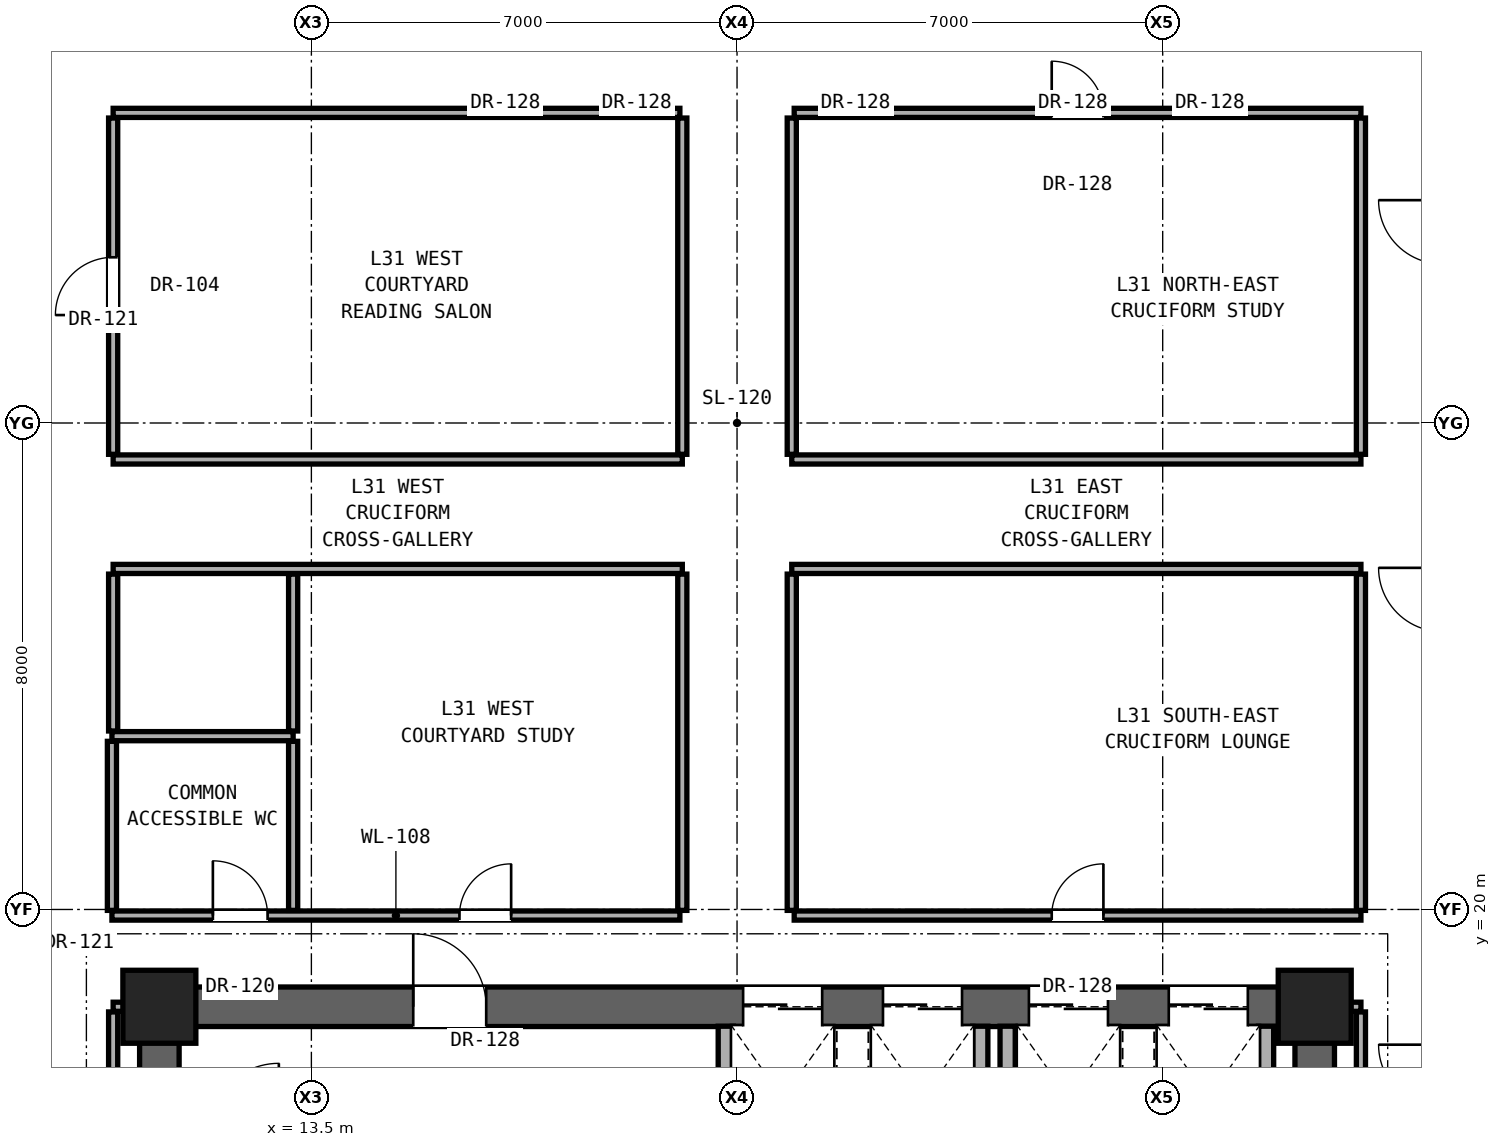
"""IFC4 building model, lengths in metres.
Left out: names, types, materials, properties, quantities, classifications, styles, units other than length and angle.
Written with IfcOpenShell. Run it as: python <this file> out.ifc"""

import sys

from ifc_helpers import new_model, si_unit, direction, frame, frame_2d, origin, origin_2d, place, context, subcontext, project, spatial, rectangle, extrude, element, fill, save


model = new_model("IFC4")
c1 = context("Model", 3, precision=1e-05, world=origin(), true_north=direction((0.0, 1.0)))
c2 = subcontext(c1, "Body", "Model", "MODEL_VIEW")
j1 = project(units=[si_unit("LENGTHUNIT", "METRE"), si_unit("PLANEANGLEUNIT", "RADIAN")], contexts=[c1])
p1 = place(None, origin())
s1 = spatial("IfcSite", under=j1, at=p1, CompositionType="ELEMENT")
p2 = place(p1, origin())
s2 = spatial("IfcBuilding", under=s1, at=p2, CompositionType="ELEMENT")
p3 = place(p2, frame((0.0, 0.0, 111.5)))
s3 = spatial("IfcBuildingStorey", under=s2, at=p3, CompositionType="ELEMENT", Elevation=111.5)
for number, where, z_axis, x_axis in (
    (1, (11.0, 18.4, 0.0), (0.0, 0.0, 1.0), (1.0, 0.0, 0.0)),
    (2, (30.0, 18.4, 0.0), (0.0, 0.0, 1.0), (1.0, 0.0, 0.0)),
):
    element("IfcColumn", number, at=place(p3, frame(where, z_axis=z_axis, x_axis=x_axis)), inside=s3, PredefinedType="COLUMN", context=c2, shape_type="SweptSolid", body=[
        extrude(rectangle(XDim=1.2, YDim=1.2, at=origin_2d()), origin(), (0.0, 0.0, 1.0), 3.3),
    ])
for number, where, z_axis, x_axis in (
    (3, (11.0, 12.4, 0.0), (0.0, 0.0, 1.0), (0.0, 1.0, 0.0)),
    (4, (30.0, 12.4, 0.0), (0.0, 0.0, 1.0), (0.0, 1.0, 0.0)),
):
    element("IfcWall", number, at=place(p3, frame(where, z_axis=z_axis, x_axis=x_axis)), inside=s3, PredefinedType="SHEAR", context=c2, shape_type="SweptSolid", body=[
        extrude(rectangle(XDim=6.0, YDim=0.65, at=frame_2d((3.0, 0.0))), origin(), (0.0, 0.0, 1.0), 3.08),
    ])
p4 = place(p3, frame((11.0, 18.4, 0.0), z_axis=(0.0, 0.0, 1.0), x_axis=(1.0, 0.0, 0.0)))
e5 = element("IfcWall", 5, at=p4, inside=s3, PredefinedType="SHEAR", context=c2, shape_type="SweptSolid", body=[
    extrude(rectangle(XDim=19.0, YDim=0.65, at=frame_2d((9.5, 0.0))), origin(), (0.0, 0.0, 1.0), 3.08),
])
p5 = place(p4, frame((4.175, 0.0, 0.0)))
e6 = element("IfcOpeningElement", 6, at=p5, cuts=e5, PredefinedType="OPENING", context=c2, shape_type="SweptSolid", body=[
    extrude(rectangle(XDim=1.2, YDim=2.25, at=frame_2d((0.6, 1.125))), frame((0.0, 0.335, 0.0), z_axis=(0.0, -1.0, 0.0), x_axis=(1.0, 0.0, 0.0)), (0.0, 0.0, 1.0), 0.67),
])
p6 = place(p4, frame((9.6, 0.0, 0.0)))
e7 = element("IfcOpeningElement", 7, at=p6, cuts=e5, PredefinedType="OPENING", context=c2, shape_type="SweptSolid", body=[
    extrude(rectangle(XDim=1.3, YDim=2.3, at=frame_2d((0.65, 1.15))), frame((0.0, 0.335, 0.0), z_axis=(0.0, -1.0, 0.0), x_axis=(1.0, 0.0, 0.0)), (0.0, 0.0, 1.0), 0.67),
])
p7 = place(p4, frame((11.9, 0.0, 0.0)))
e8 = element("IfcOpeningElement", 8, at=p7, cuts=e5, PredefinedType="OPENING", context=c2, shape_type="SweptSolid", body=[
    extrude(rectangle(XDim=1.3, YDim=2.3, at=frame_2d((0.65, 1.15))), frame((0.0, 0.335, 0.0), z_axis=(0.0, -1.0, 0.0), x_axis=(1.0, 0.0, 0.0)), (0.0, 0.0, 1.0), 0.67),
])
p8 = place(p4, frame((14.3, 0.0, 0.0)))
e9 = element("IfcOpeningElement", 9, at=p8, cuts=e5, PredefinedType="OPENING", context=c2, shape_type="SweptSolid", body=[
    extrude(rectangle(XDim=1.3, YDim=2.3, at=frame_2d((0.65, 1.15))), frame((0.0, 0.335, 0.0), z_axis=(0.0, -1.0, 0.0), x_axis=(1.0, 0.0, 0.0)), (0.0, 0.0, 1.0), 0.67),
])
p9 = place(p4, frame((16.6, 0.0, 0.0)))
e10 = element("IfcOpeningElement", 10, at=p9, cuts=e5, PredefinedType="OPENING", context=c2, shape_type="SweptSolid", body=[
    extrude(rectangle(XDim=1.3, YDim=2.3, at=frame_2d((0.65, 1.15))), frame((0.0, 0.335, 0.0), z_axis=(0.0, -1.0, 0.0), x_axis=(1.0, 0.0, 0.0)), (0.0, 0.0, 1.0), 0.67),
])
for number, where, z_axis, x_axis in (
    (11, (10.24, 18.4, 0.0), (0.0, 0.0, 1.0), (1.0, 0.0, 0.0)),
    (12, (30.32, 18.4, 0.0), (0.0, 0.0, 1.0), (1.0, 0.0, 0.0)),
):
    element("IfcWall", number, at=place(p3, frame(where, z_axis=z_axis, x_axis=x_axis)), inside=s3, PredefinedType="PARTITIONING", context=c2, shape_type="SweptSolid", body=[
        extrude(rectangle(XDim=0.44, YDim=0.15, at=frame_2d((0.22, 0.0))), origin(), (0.0, 0.0, 1.0), 2.456),
    ])
p10 = place(p3, frame((10.22, 19.9, 0.0), z_axis=(0.0, 0.0, 1.0), x_axis=(1.0, 0.0, 0.0)))
e13 = element("IfcWall", 13, at=p10, inside=s3, PredefinedType="PARTITIONING", context=c2, shape_type="SweptSolid", body=[
    extrude(rectangle(XDim=9.34, YDim=0.15, at=frame_2d((4.67, 0.0))), origin(), (0.0, 0.0, 1.0), 2.124),
])
p11 = place(p10, frame((1.66, 0.0, 0.0)))
e14 = element("IfcOpeningElement", 14, at=p11, cuts=e13, PredefinedType="OPENING", context=c2, shape_type="SweptSolid", body=[
    extrude(rectangle(XDim=0.9, YDim=2.1, at=frame_2d((0.45, 1.05))), frame((0.0, 0.085, 0.0), z_axis=(0.0, -1.0, 0.0), x_axis=(1.0, 0.0, 0.0)), (0.0, 0.0, 1.0), 0.17),
])
p12 = place(p10, frame((5.715, 0.0, 0.0)))
e15 = element("IfcOpeningElement", 15, at=p12, cuts=e13, PredefinedType="OPENING", context=c2, shape_type="SweptSolid", body=[
    extrude(rectangle(XDim=0.85, YDim=2.01, at=frame_2d((0.425, 1.005))), frame((0.0, 0.085, 0.0), z_axis=(0.0, -1.0, 0.0), x_axis=(1.0, 0.0, 0.0)), (0.0, 0.0, 1.0), 0.17),
])
p13 = place(p3, frame((21.44, 19.9, 0.0), z_axis=(0.0, 0.0, 1.0), x_axis=(1.0, 0.0, 0.0)))
e16 = element("IfcWall", 16, at=p13, inside=s3, PredefinedType="PARTITIONING", context=c2, shape_type="SweptSolid", body=[
    extrude(rectangle(XDim=9.32, YDim=0.15, at=frame_2d((4.66, 0.0))), origin(), (0.0, 0.0, 1.0), 2.124),
])
p14 = place(p13, frame((4.235, 0.0, 0.0)))
e17 = element("IfcOpeningElement", 17, at=p14, cuts=e16, PredefinedType="OPENING", context=c2, shape_type="SweptSolid", body=[
    extrude(rectangle(XDim=0.85, YDim=2.01, at=frame_2d((0.425, 1.005))), frame((0.0, 0.085, 0.0), z_axis=(0.0, -1.0, 0.0), x_axis=(1.0, 0.0, 0.0)), (0.0, 0.0, 1.0), 0.17),
])
p15 = place(p3, frame((10.22, 22.85, 0.0), z_axis=(0.0, 0.0, 1.0), x_axis=(1.0, 0.0, 0.0)))
e18 = element("IfcWall", 18, at=p15, inside=s3, PredefinedType="PARTITIONING", context=c2, shape_type="SweptSolid", body=[
    extrude(rectangle(XDim=2.98, YDim=0.15, at=frame_2d((1.49, 0.0))), origin(), (0.0, 0.0, 1.0), 2.124),
])
for number, where, z_axis, x_axis in (
    (19, (10.24, 25.6, 0.0), (0.0, 0.0, 1.0), (1.0, 0.0, 0.0)),
    (20, (21.4, 25.6, 0.0), (0.0, 0.0, 1.0), (1.0, 0.0, 0.0)),
    (21, (10.24, 27.4, 0.0), (0.0, 0.0, 1.0), (1.0, 0.0, 0.0)),
    (22, (21.4, 27.4, 0.0), (0.0, 0.0, 1.0), (1.0, 0.0, 0.0)),
):
    element("IfcWall", number, at=place(p3, frame(where, z_axis=z_axis, x_axis=x_axis)), inside=s3, PredefinedType="PARTITIONING", context=c2, shape_type="SweptSolid", body=[
        extrude(rectangle(XDim=9.36, YDim=0.15, at=frame_2d((4.68, 0.0))), origin(), (0.0, 0.0, 1.0), 2.124),
    ])
p16 = place(p3, frame((10.24, 33.1, 0.0), z_axis=(0.0, 0.0, 1.0), x_axis=(1.0, 0.0, 0.0)))
e23 = element("IfcWall", 23, at=p16, inside=s3, PredefinedType="PARTITIONING", context=c2, shape_type="SweptSolid", body=[
    extrude(rectangle(XDim=9.32, YDim=0.15, at=frame_2d((4.66, 0.0))), origin(), (0.0, 0.0, 1.0), 2.124),
])
p17 = place(p3, frame((21.44, 33.1, 0.0), z_axis=(0.0, 0.0, 1.0), x_axis=(1.0, 0.0, 0.0)))
e24 = element("IfcWall", 24, at=p17, inside=s3, PredefinedType="PARTITIONING", context=c2, shape_type="SweptSolid", body=[
    extrude(rectangle(XDim=9.32, YDim=0.15, at=frame_2d((4.66, 0.0))), origin(), (0.0, 0.0, 1.0), 2.124),
])
p18 = place(p17, frame((4.235, 0.0, 0.0)))
e25 = element("IfcOpeningElement", 25, at=p18, cuts=e24, PredefinedType="OPENING", context=c2, shape_type="SweptSolid", body=[
    extrude(rectangle(XDim=0.85, YDim=2.01, at=frame_2d((0.425, 1.005))), frame((0.0, 0.085, 0.0), z_axis=(0.0, -1.0, 0.0), x_axis=(1.0, 0.0, 0.0)), (0.0, 0.0, 1.0), 0.17),
])
p19 = place(p3, frame((10.22, 19.985, 0.0), z_axis=(0.0, 0.0, 1.0), x_axis=(0.0, 1.0, 0.0)))
e26 = element("IfcWall", 26, at=p19, inside=s3, PredefinedType="PARTITIONING", context=c2, shape_type="SweptSolid", body=[
    extrude(rectangle(XDim=2.78, YDim=0.15, at=frame_2d((1.39, 0.0))), origin(), (0.0, 0.0, 1.0), 3.08),
])
p20 = place(p3, frame((10.24, 12.335, 0.0), z_axis=(0.0, 0.0, 1.0), x_axis=(0.0, 1.0, 0.0)))
e27 = element("IfcWall", 27, at=p20, inside=s3, PredefinedType="PARTITIONING", context=c2, shape_type="SweptSolid", body=[
    extrude(rectangle(XDim=5.98, YDim=0.15, at=frame_2d((2.99, 0.0))), origin(), (0.0, 0.0, 1.0), 2.456),
])
p21 = place(p3, frame((10.24, 22.935, 0.0), z_axis=(0.0, 0.0, 1.0), x_axis=(0.0, 1.0, 0.0)))
e28 = element("IfcWall", 28, at=p21, inside=s3, PredefinedType="PARTITIONING", context=c2, shape_type="SweptSolid", body=[
    extrude(rectangle(XDim=2.58, YDim=0.15, at=frame_2d((1.29, 0.0))), origin(), (0.0, 0.0, 1.0), 2.299),
])
p22 = place(p3, frame((10.24, 27.485, 0.0), z_axis=(0.0, 0.0, 1.0), x_axis=(0.0, 1.0, 0.0)))
e29 = element("IfcWall", 29, at=p22, inside=s3, PredefinedType="PARTITIONING", context=c2, shape_type="SweptSolid", body=[
    extrude(rectangle(XDim=5.53, YDim=0.15, at=frame_2d((2.765, 0.0))), origin(), (0.0, 0.0, 1.0), 2.299),
])
p23 = place(p22, frame((2.29, 0.0, 0.0)))
e30 = element("IfcOpeningElement", 30, at=p23, cuts=e29, PredefinedType="OPENING", context=c2, shape_type="SweptSolid", body=[
    extrude(rectangle(XDim=0.95, YDim=2.15, at=frame_2d((0.475, 1.075))), frame((0.0, 0.085, 0.0), z_axis=(0.0, -1.0, 0.0), x_axis=(1.0, 0.0, 0.0)), (0.0, 0.0, 1.0), 0.17),
])
p24 = place(p3, frame((13.2, 19.985, 0.0), z_axis=(0.0, 0.0, 1.0), x_axis=(0.0, 1.0, 0.0)))
e31 = element("IfcWall", 31, at=p24, inside=s3, PredefinedType="PARTITIONING", context=c2, shape_type="SweptSolid", body=[
    extrude(rectangle(XDim=2.78, YDim=0.15, at=frame_2d((1.39, 0.0))), origin(), (0.0, 0.0, 1.0), 3.08),
])
p25 = place(p3, frame((13.2, 22.935, 0.0), z_axis=(0.0, 0.0, 1.0), x_axis=(0.0, 1.0, 0.0)))
e32 = element("IfcWall", 32, at=p25, inside=s3, PredefinedType="PARTITIONING", context=c2, shape_type="SweptSolid", body=[
    extrude(rectangle(XDim=2.58, YDim=0.15, at=frame_2d((1.29, 0.0))), origin(), (0.0, 0.0, 1.0), 2.124),
])
for number, where, z_axis, x_axis in (
    (33, (19.6, 19.985, 0.0), (0.0, 0.0, 1.0), (0.0, 1.0, 0.0)),
    (34, (19.6, 27.485, 0.0), (0.0, 0.0, 1.0), (0.0, 1.0, 0.0)),
):
    element("IfcWall", number, at=place(p3, frame(where, z_axis=z_axis, x_axis=x_axis)), inside=s3, PredefinedType="PARTITIONING", context=c2, shape_type="SweptSolid", body=[
        extrude(rectangle(XDim=5.53, YDim=0.15, at=frame_2d((2.765, 0.0))), origin(), (0.0, 0.0, 1.0), 2.124),
    ])
p26 = place(p3, frame((20.315, 16.555, 0.0), z_axis=(0.0, 0.0, 1.0), x_axis=(0.0, 1.0, 0.0)))
e35 = element("IfcWall", 35, at=p26, inside=s3, PredefinedType="SOLIDWALL", context=c2, shape_type="SweptSolid", body=[
    extrude(rectangle(XDim=1.525, YDim=0.25, at=frame_2d((0.763, 0.0))), origin(), (0.0, 0.0, 1.0), 3.08),
])
for number, where, z_axis, x_axis in (
    (36, (21.4, 19.985, 0.0), (0.0, 0.0, 1.0), (0.0, 1.0, 0.0)),
    (37, (21.4, 27.485, 0.0), (0.0, 0.0, 1.0), (0.0, 1.0, 0.0)),
):
    element("IfcWall", number, at=place(p3, frame(where, z_axis=z_axis, x_axis=x_axis)), inside=s3, PredefinedType="PARTITIONING", context=c2, shape_type="SweptSolid", body=[
        extrude(rectangle(XDim=5.53, YDim=0.15, at=frame_2d((2.765, 0.0))), origin(), (0.0, 0.0, 1.0), 2.124),
    ])
for number, where, z_axis, x_axis in (
    (38, (24.5, 15.785, 0.0), (0.0, 0.0, 1.0), (0.0, 1.0, 0.0)),
    (39, (24.95, 15.785, 0.0), (0.0, 0.0, 1.0), (0.0, 1.0, 0.0)),
    (40, (29.2, 15.785, 0.0), (0.0, 0.0, 1.0), (0.0, 1.0, 0.0)),
):
    element("IfcWall", number, at=place(p3, frame(where, z_axis=z_axis, x_axis=x_axis)), inside=s3, PredefinedType="SOLIDWALL", context=c2, shape_type="SweptSolid", body=[
        extrude(rectangle(XDim=2.295, YDim=0.25, at=frame_2d((1.147, 0.0))), origin(), (0.0, 0.0, 1.0), 3.08),
    ])
p27 = place(p3, frame((30.76, 12.335, 0.0), z_axis=(0.0, 0.0, 1.0), x_axis=(0.0, 1.0, 0.0)))
e41 = element("IfcWall", 41, at=p27, inside=s3, PredefinedType="PARTITIONING", context=c2, shape_type="SweptSolid", body=[
    extrude(rectangle(XDim=5.98, YDim=0.15, at=frame_2d((2.99, 0.0))), origin(), (0.0, 0.0, 1.0), 2.456),
])
for number, where, z_axis, x_axis in (
    (42, (30.76, 19.985, 0.0), (0.0, 0.0, 1.0), (0.0, 1.0, 0.0)),
    (43, (30.76, 27.485, 0.0), (0.0, 0.0, 1.0), (0.0, 1.0, 0.0)),
):
    element("IfcWall", number, at=place(p3, frame(where, z_axis=z_axis, x_axis=x_axis)), inside=s3, PredefinedType="PARTITIONING", context=c2, shape_type="SweptSolid", body=[
        extrude(rectangle(XDim=5.53, YDim=0.15, at=frame_2d((2.765, 0.0))), origin(), (0.0, 0.0, 1.0), 2.299),
    ])
p28 = place(p5, origin())
e44 = element("IfcDoor", 44, at=p28, inside=s3, OperationType="SINGLE_SWING_LEFT", PredefinedType="DOOR", context=c2, shape_type="SweptSolid", body=[
    extrude(rectangle(XDim=1.2, YDim=2.25, at=frame_2d((0.6, 1.125))), frame((0.0, 0.025, 0.0), z_axis=(0.0, -1.0, 0.0), x_axis=(1.0, 0.0, 0.0)), (0.0, 0.0, 1.0), 0.05),
])
fill(e6, e44)
p29 = place(p11, origin())
e45 = element("IfcDoor", 45, at=p29, inside=s3, OperationType="SINGLE_SWING_LEFT", PredefinedType="DOOR", context=c2, shape_type="SweptSolid", body=[
    extrude(rectangle(XDim=0.9, YDim=2.1, at=frame_2d((0.45, 1.05))), frame((0.0, 0.025, 0.0), z_axis=(0.0, -1.0, 0.0), x_axis=(1.0, 0.0, 0.0)), (0.0, 0.0, 1.0), 0.05),
])
fill(e14, e45)
p30 = place(p12, origin())
e46 = element("IfcDoor", 46, at=p30, inside=s3, OperationType="SINGLE_SWING_RIGHT", PredefinedType="DOOR", context=c2, shape_type="SweptSolid", body=[
    extrude(rectangle(XDim=0.85, YDim=2.01, at=frame_2d((0.425, 1.005))), frame((0.0, 0.025, 0.0), z_axis=(0.0, -1.0, 0.0), x_axis=(1.0, 0.0, 0.0)), (0.0, 0.0, 1.0), 0.05),
])
fill(e15, e46)
p31 = place(p23, origin())
e47 = element("IfcDoor", 47, at=p31, inside=s3, OperationType="SINGLE_SWING_LEFT", PredefinedType="DOOR", context=c2, shape_type="SweptSolid", body=[
    extrude(rectangle(XDim=0.95, YDim=2.15, at=frame_2d((0.475, 1.075))), frame((0.0, 0.025, 0.0), z_axis=(0.0, -1.0, 0.0), x_axis=(1.0, 0.0, 0.0)), (0.0, 0.0, 1.0), 0.05),
])
fill(e30, e47)
p32 = place(p14, origin())
e48 = element("IfcDoor", 48, at=p32, inside=s3, OperationType="SINGLE_SWING_RIGHT", PredefinedType="DOOR", context=c2, shape_type="SweptSolid", body=[
    extrude(rectangle(XDim=0.85, YDim=2.01, at=frame_2d((0.425, 1.005))), frame((0.0, 0.025, 0.0), z_axis=(0.0, -1.0, 0.0), x_axis=(1.0, 0.0, 0.0)), (0.0, 0.0, 1.0), 0.05),
])
fill(e17, e48)
p33 = place(p18, origin())
e49 = element("IfcDoor", 49, at=p33, inside=s3, OperationType="SINGLE_SWING_LEFT", PredefinedType="DOOR", context=c2, shape_type="SweptSolid", body=[
    extrude(rectangle(XDim=0.85, YDim=2.01, at=frame_2d((0.425, 1.005))), frame((0.0, 0.025, 0.0), z_axis=(0.0, -1.0, 0.0), x_axis=(1.0, 0.0, 0.0)), (0.0, 0.0, 1.0), 0.05),
])
fill(e25, e49)
p34 = place(p6, origin())
e50 = element("IfcDoor", 50, at=p34, inside=s3, OperationType="DOUBLE_DOOR_SLIDING", PredefinedType="DOOR", context=c2, shape_type="SweptSolid", body=[
    extrude(rectangle(XDim=1.3, YDim=2.3, at=frame_2d((0.65, 1.15))), frame((0.0, 0.025, 0.0), z_axis=(0.0, -1.0, 0.0), x_axis=(1.0, 0.0, 0.0)), (0.0, 0.0, 1.0), 0.05),
])
fill(e7, e50)
p35 = place(p7, origin())
e51 = element("IfcDoor", 51, at=p35, inside=s3, OperationType="DOUBLE_DOOR_SLIDING", PredefinedType="DOOR", context=c2, shape_type="SweptSolid", body=[
    extrude(rectangle(XDim=1.3, YDim=2.3, at=frame_2d((0.65, 1.15))), frame((0.0, 0.025, 0.0), z_axis=(0.0, -1.0, 0.0), x_axis=(1.0, 0.0, 0.0)), (0.0, 0.0, 1.0), 0.05),
])
fill(e8, e51)
p36 = place(p8, origin())
e52 = element("IfcDoor", 52, at=p36, inside=s3, OperationType="DOUBLE_DOOR_SLIDING", PredefinedType="DOOR", context=c2, shape_type="SweptSolid", body=[
    extrude(rectangle(XDim=1.3, YDim=2.3, at=frame_2d((0.65, 1.15))), frame((0.0, 0.025, 0.0), z_axis=(0.0, -1.0, 0.0), x_axis=(1.0, 0.0, 0.0)), (0.0, 0.0, 1.0), 0.05),
])
fill(e9, e52)
p37 = place(p9, origin())
e53 = element("IfcDoor", 53, at=p37, inside=s3, OperationType="DOUBLE_DOOR_SLIDING", PredefinedType="DOOR", context=c2, shape_type="SweptSolid", body=[
    extrude(rectangle(XDim=1.3, YDim=2.3, at=frame_2d((0.65, 1.15))), frame((0.0, 0.025, 0.0), z_axis=(0.0, -1.0, 0.0), x_axis=(1.0, 0.0, 0.0)), (0.0, 0.0, 1.0), 0.05),
])
fill(e10, e53)
save(model, sys.argv[1])
